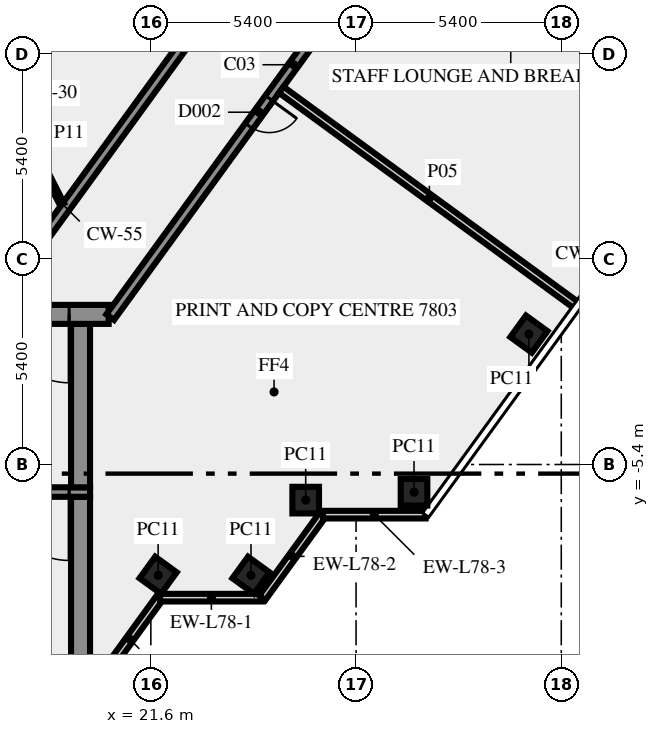
"""IFC4 building model, lengths in metres.
Left out: names, types, materials, properties, quantities, classifications, styles, units other than length and angle.
Written with IfcOpenShell. Run it as: python <this file> out.ifc"""

import sys

from ifc_helpers import new_model, si_unit, direction, frame, frame_2d, origin, origin_2d, place, context, subcontext, project, spatial, rectangle, extrude, element, fill, save


model = new_model("IFC4")
c1 = context("Model", 3, precision=1e-05, world=origin(), true_north=direction((0.0, 1.0)))
c2 = subcontext(c1, "Body", "Model", "MODEL_VIEW")
j1 = project(units=[si_unit("LENGTHUNIT", "METRE"), si_unit("PLANEANGLEUNIT", "RADIAN")], contexts=[c1])
p1 = place(None, origin())
s1 = spatial("IfcSite", under=j1, at=p1, CompositionType="ELEMENT")
p2 = place(p1, origin())
s2 = spatial("IfcBuilding", under=s1, at=p2, CompositionType="ELEMENT")
p3 = place(p2, frame((0.0, 0.0, 335.0)))
s3 = spatial("IfcBuildingStorey", under=s2, at=p3, CompositionType="ELEMENT", Elevation=335.0)
for number, where, z_axis, x_axis in (
    (1, (21.792, -8.315, 0.0), (0.0, 0.0, 1.0), (0.588, 0.809, 0.0)),
    (2, (24.235, -8.315, 0.0), (0.0, 0.0, 1.0), (0.588, 0.809, 0.0)),
    (3, (25.674, -6.337, 0.0), (0.0, 0.0, 1.0), (1.0, 0.0, 0.0)),
    (4, (28.525, -6.13, 0.0), (0.0, 0.0, 1.0), (1.0, 0.0, 0.0)),
    (5, (31.548, -1.969, 0.0), (0.0, 0.0, 1.0), (0.588, 0.809, 0.0)),
):
    element("IfcColumn", number, at=place(p3, frame(where, z_axis=z_axis, x_axis=x_axis)), inside=s3, PredefinedType="COLUMN", context=c2, shape_type="SweptSolid", body=[
        extrude(rectangle(XDim=0.7, YDim=0.7, at=origin_2d()), origin(), (0.0, 0.0, 1.0), 3.65),
    ])
p4 = place(p3, frame((20.253, -11.083, 0.0), z_axis=(0.0, 0.0, 1.0), x_axis=(0.587766567315, 0.809030569476, 0.0)))
e6 = element("IfcWall", 6, at=p4, inside=s3, PredefinedType="SOLIDWALL", context=c2, shape_type="SweptSolid", body=[
    extrude(rectangle(XDim=2.688, YDim=0.2, at=frame_2d((1.344, 0.0))), origin(), (0.0, 0.0, 1.0), 3.65),
])
p5 = place(p3, frame((21.843, -8.904, 0.0), z_axis=(0.0, 0.0, 1.0), x_axis=(1.0, 0.0, 0.0)))
e7 = element("IfcWall", 7, at=p5, inside=s3, PredefinedType="SOLIDWALL", context=c2, shape_type="SweptSolid", body=[
    extrude(rectangle(XDim=2.7, YDim=0.2, at=frame_2d((1.35, 0.0))), origin(), (0.0, 0.0, 1.0), 3.65),
])
p6 = place(p3, frame((24.533, -8.909, 0.0), z_axis=(0.0, 0.0, 1.0), x_axis=(0.587720002413, 0.809064397168, 0.0)))
e8 = element("IfcWall", 8, at=p6, inside=s3, PredefinedType="SOLIDWALL", context=c2, shape_type="SweptSolid", body=[
    extrude(rectangle(XDim=2.7, YDim=0.2, at=frame_2d((1.35, 0.0))), origin(), (0.0, 0.0, 1.0), 3.65),
])
p7 = place(p3, frame((26.13, -6.719, 0.0), z_axis=(0.0, 0.0, 1.0), x_axis=(1.0, 0.0, 0.0)))
e9 = element("IfcWall", 9, at=p7, inside=s3, PredefinedType="SOLIDWALL", context=c2, shape_type="SweptSolid", body=[
    extrude(rectangle(XDim=2.7, YDim=0.2, at=frame_2d((1.35, 0.0))), origin(), (0.0, 0.0, 1.0), 3.65),
])
p8 = place(p3, frame((19.75, -10.5, 0.0), z_axis=(0.0, 0.0, 1.0), x_axis=(0.0, 1.0, 0.0)))
e10 = element("IfcWall", 10, at=p8, inside=s3, PredefinedType="SHEAR", context=c2, shape_type="SweptSolid", body=[
    extrude(rectangle(XDim=4.25, YDim=0.5, at=frame_2d((2.125, 0.0))), origin(), (0.0, 0.0, 1.0), 3.65),
])
p9 = place(p3, frame((20.0, -6.125, 0.0), z_axis=(0.0, 0.0, 1.0), x_axis=(-1.0, 0.0, 0.0)))
e11 = element("IfcWall", 11, at=p9, inside=s3, PredefinedType="SHEAR", context=c2, shape_type="SweptSolid", body=[
    extrude(rectangle(XDim=10.8, YDim=0.25, at=frame_2d((5.4, 0.0))), origin(), (0.0, 0.0, 1.0), 3.65),
])
p10 = place(p9, frame((0.55, 0.0, 0.0)))
e12 = element("IfcOpeningElement", 12, at=p10, cuts=e11, PredefinedType="OPENING", context=c2, shape_type="SweptSolid", body=[
    extrude(rectangle(XDim=1.8, YDim=2.1, at=frame_2d((0.9, 1.05))), frame((0.0, 0.135, 0.0), z_axis=(0.0, -1.0, 0.0), x_axis=(1.0, 0.0, 0.0)), (0.0, 0.0, 1.0), 0.27),
])
p11 = place(p3, frame((19.75, -6.0, 0.0), z_axis=(0.0, 0.0, 1.0), x_axis=(0.0, 1.0, 0.0)))
e13 = element("IfcWall", 13, at=p11, inside=s3, PredefinedType="SHEAR", context=c2, shape_type="SweptSolid", body=[
    extrude(rectangle(XDim=4.3, YDim=0.5, at=frame_2d((2.15, 0.0))), origin(), (0.0, 0.0, 1.0), 3.65),
])
p12 = place(p3, frame((20.49, -1.45, 0.0), z_axis=(0.0, 0.0, 1.0), x_axis=(-1.0, 0.0, 0.0)))
e14 = element("IfcWall", 14, at=p12, inside=s3, PredefinedType="SHEAR", context=c2, shape_type="SweptSolid", body=[
    extrude(rectangle(XDim=40.98, YDim=0.5, at=frame_2d((20.49, 0.0))), origin(), (0.0, 0.0, 1.0), 3.65),
])
p13 = place(p12, frame((38.14, 0.0, 0.0)))
e15 = element("IfcOpeningElement", 15, at=p13, cuts=e14, PredefinedType="OPENING", context=c2, shape_type="SweptSolid", body=[
    extrude(rectangle(XDim=1.8, YDim=2.1, at=frame_2d((0.9, 1.05))), frame((0.0, 0.26, 0.0), z_axis=(0.0, -1.0, 0.0), x_axis=(1.0, 0.0, 0.0)), (0.0, 0.0, 1.0), 0.52),
])
p14 = place(p12, frame((36.728, 0.0, 0.0)))
e16 = element("IfcOpeningElement", 16, at=p14, cuts=e14, PredefinedType="OPENING", context=c2, shape_type="SweptSolid", body=[
    extrude(rectangle(XDim=0.8, YDim=2.1, at=frame_2d((0.4, 1.05))), frame((0.0, 0.26, 0.0), z_axis=(0.0, -1.0, 0.0), x_axis=(1.0, 0.0, 0.0)), (0.0, 0.0, 1.0), 0.52),
])
p15 = place(p12, frame((35.153, 0.0, 0.0)))
e17 = element("IfcOpeningElement", 17, at=p15, cuts=e14, PredefinedType="OPENING", context=c2, shape_type="SweptSolid", body=[
    extrude(rectangle(XDim=0.8, YDim=2.1, at=frame_2d((0.4, 1.05))), frame((0.0, 0.26, 0.0), z_axis=(0.0, -1.0, 0.0), x_axis=(1.0, 0.0, 0.0)), (0.0, 0.0, 1.0), 0.52),
])
p16 = place(p12, frame((32.94, 0.0, 0.0)))
e18 = element("IfcOpeningElement", 18, at=p16, cuts=e14, PredefinedType="OPENING", context=c2, shape_type="SweptSolid", body=[
    extrude(rectangle(XDim=0.9, YDim=2.1, at=frame_2d((0.45, 1.05))), frame((0.0, 0.26, 0.0), z_axis=(0.0, -1.0, 0.0), x_axis=(1.0, 0.0, 0.0)), (0.0, 0.0, 1.0), 0.52),
])
p17 = place(p12, frame((31.015, 0.0, 0.0)))
e19 = element("IfcOpeningElement", 19, at=p17, cuts=e14, PredefinedType="OPENING", context=c2, shape_type="SweptSolid", body=[
    extrude(rectangle(XDim=0.8, YDim=2.1, at=frame_2d((0.4, 1.05))), frame((0.0, 0.26, 0.0), z_axis=(0.0, -1.0, 0.0), x_axis=(1.0, 0.0, 0.0)), (0.0, 0.0, 1.0), 0.52),
])
p18 = place(p12, frame((24.765, 0.0, 0.0)))
e20 = element("IfcOpeningElement", 20, at=p18, cuts=e14, PredefinedType="OPENING", context=c2, shape_type="SweptSolid", body=[
    extrude(rectangle(XDim=0.8, YDim=2.1, at=frame_2d((0.4, 1.05))), frame((0.0, 0.26, 0.0), z_axis=(0.0, -1.0, 0.0), x_axis=(1.0, 0.0, 0.0)), (0.0, 0.0, 1.0), 0.52),
])
p19 = place(p12, frame((19.59, 0.0, 0.0)))
e21 = element("IfcOpeningElement", 21, at=p19, cuts=e14, PredefinedType="OPENING", context=c2, shape_type="SweptSolid", body=[
    extrude(rectangle(XDim=2.0, YDim=2.1, at=frame_2d((1.0, 1.05))), frame((0.0, 0.26, 0.0), z_axis=(0.0, -1.0, 0.0), x_axis=(1.0, 0.0, 0.0)), (0.0, 0.0, 1.0), 0.52),
])
p20 = place(p12, frame((15.103, 0.0, 0.0)))
e22 = element("IfcOpeningElement", 22, at=p20, cuts=e14, PredefinedType="OPENING", context=c2, shape_type="SweptSolid", body=[
    extrude(rectangle(XDim=0.9, YDim=2.1, at=frame_2d((0.45, 1.05))), frame((0.0, 0.26, 0.0), z_axis=(0.0, -1.0, 0.0), x_axis=(1.0, 0.0, 0.0)), (0.0, 0.0, 1.0), 0.52),
])
p21 = place(p12, frame((13.04, 0.0, 0.0)))
e23 = element("IfcOpeningElement", 23, at=p21, cuts=e14, PredefinedType="OPENING", context=c2, shape_type="SweptSolid", body=[
    extrude(rectangle(XDim=0.9, YDim=2.1, at=frame_2d((0.45, 1.05))), frame((0.0, 0.26, 0.0), z_axis=(0.0, -1.0, 0.0), x_axis=(1.0, 0.0, 0.0)), (0.0, 0.0, 1.0), 0.52),
])
p22 = place(p12, frame((10.177, 0.0, 0.0)))
e24 = element("IfcOpeningElement", 24, at=p22, cuts=e14, PredefinedType="OPENING", context=c2, shape_type="SweptSolid", body=[
    extrude(rectangle(XDim=0.9, YDim=2.1, at=frame_2d((0.45, 1.05))), frame((0.0, 0.26, 0.0), z_axis=(0.0, -1.0, 0.0), x_axis=(1.0, 0.0, 0.0)), (0.0, 0.0, 1.0), 0.52),
])
p23 = place(p12, frame((7.14, 0.0, 0.0)))
e25 = element("IfcOpeningElement", 25, at=p23, cuts=e14, PredefinedType="OPENING", context=c2, shape_type="SweptSolid", body=[
    extrude(rectangle(XDim=0.9, YDim=2.1, at=frame_2d((0.45, 1.05))), frame((0.0, 0.26, 0.0), z_axis=(0.0, -1.0, 0.0), x_axis=(1.0, 0.0, 0.0)), (0.0, 0.0, 1.0), 0.52),
])
p24 = place(p12, frame((4.19, 0.0, 0.0)))
e26 = element("IfcOpeningElement", 26, at=p24, cuts=e14, PredefinedType="OPENING", context=c2, shape_type="SweptSolid", body=[
    extrude(rectangle(XDim=0.9, YDim=2.1, at=frame_2d((0.45, 1.05))), frame((0.0, 0.26, 0.0), z_axis=(0.0, -1.0, 0.0), x_axis=(1.0, 0.0, 0.0)), (0.0, 0.0, 1.0), 0.52),
])
p25 = place(p12, frame((1.04, 0.0, 0.0)))
e27 = element("IfcOpeningElement", 27, at=p25, cuts=e14, PredefinedType="OPENING", context=c2, shape_type="SweptSolid", body=[
    extrude(rectangle(XDim=1.8, YDim=2.1, at=frame_2d((0.9, 1.05))), frame((0.0, 0.26, 0.0), z_axis=(0.0, -1.0, 0.0), x_axis=(1.0, 0.0, 0.0)), (0.0, 0.0, 1.0), 0.52),
])
p26 = place(p3, frame((17.545, -1.125, 0.0), z_axis=(0.0, 0.0, 1.0), x_axis=(0.58779555165, 0.809009511354, 0.0)))
e28 = element("IfcWall", 28, at=p26, inside=s3, PredefinedType="SOLIDWALL", context=c2, shape_type="SweptSolid", body=[
    extrude(rectangle(XDim=18.103, YDim=0.25, at=frame_2d((9.052, 0.0))), origin(), (0.0, 0.0, 1.0), 3.65),
])
p27 = place(p26, frame((16.728, 0.0, 0.0)))
e29 = element("IfcOpeningElement", 29, at=p27, cuts=e28, PredefinedType="OPENING", context=c2, shape_type="SweptSolid", body=[
    extrude(rectangle(XDim=0.9, YDim=2.1, at=frame_2d((0.45, 1.05))), frame((0.0, 0.135, 0.0), z_axis=(0.0, -1.0, 0.0), x_axis=(1.0, 0.0, 0.0)), (0.0, 0.0, 1.0), 0.27),
])
p28 = place(p3, frame((30.183, 11.761, 0.0), z_axis=(0.0, 0.0, 1.0), x_axis=(-0.587781762867, -0.80901952958, 0.0)))
e30 = element("IfcWall", 30, at=p28, inside=s3, PredefinedType="SOLIDWALL", context=c2, shape_type="SweptSolid", body=[
    extrude(rectangle(XDim=16.42, YDim=0.25, at=frame_2d((8.21, 0.0))), origin(), (0.0, 0.0, 1.0), 3.65),
])
p29 = place(p28, frame((0.225, 0.0, 0.0)))
e31 = element("IfcOpeningElement", 31, at=p29, cuts=e30, PredefinedType="OPENING", context=c2, shape_type="SweptSolid", body=[
    extrude(rectangle(XDim=0.9, YDim=2.1, at=frame_2d((0.45, 1.05))), frame((0.0, 0.135, 0.0), z_axis=(0.0, -1.0, 0.0), x_axis=(1.0, 0.0, 0.0)), (0.0, 0.0, 1.0), 0.27),
])
p30 = place(p28, frame((9.304, 0.0, 0.0)))
e32 = element("IfcOpeningElement", 32, at=p30, cuts=e30, PredefinedType="OPENING", context=c2, shape_type="SweptSolid", body=[
    extrude(rectangle(XDim=0.9, YDim=2.1, at=frame_2d((0.45, 1.05))), frame((0.0, 0.135, 0.0), z_axis=(0.0, -1.0, 0.0), x_axis=(1.0, 0.0, 0.0)), (0.0, 0.0, 1.0), 0.27),
])
p31 = place(p3, frame((25.032, 4.459, 0.0), z_axis=(0.0, 0.0, 1.0), x_axis=(0.807602415854, -0.589727342004, 0.0)))
e33 = element("IfcWall", 33, at=p31, inside=s3, PredefinedType="SOLIDWALL", context=c2, shape_type="SweptSolid", body=[
    extrude(rectangle(XDim=9.651, YDim=0.2, at=frame_2d((4.826, 0.0))), origin(), (0.0, 0.0, 1.0), 2.95),
])
p32 = place(p3, frame((18.0, 3.925, 0.0), z_axis=(0.0, 0.0, 1.0), x_axis=(0.453950796792, -0.891026752736, 0.0)))
e34 = element("IfcWall", 34, at=p32, inside=s3, PredefinedType="PARTITIONING", context=c2, shape_type="SweptSolid", body=[
    extrude(rectangle(XDim=2.778, YDim=0.12, at=frame_2d((1.389, 0.0))), origin(), (0.0, 0.0, 1.0), 3.65),
])
p33 = place(p10, origin())
e35 = element("IfcDoor", 35, at=p33, inside=s3, OperationType="DOUBLE_DOOR_SINGLE_SWING", PredefinedType="DOOR", context=c2, shape_type="SweptSolid", body=[
    extrude(rectangle(XDim=1.8, YDim=2.1, at=frame_2d((0.9, 1.05))), frame((0.0, 0.025, 0.0), z_axis=(0.0, -1.0, 0.0), x_axis=(1.0, 0.0, 0.0)), (0.0, 0.0, 1.0), 0.05),
])
fill(e12, e35)
p34 = place(p25, origin())
e36 = element("IfcDoor", 36, at=p34, inside=s3, OperationType="DOUBLE_DOOR_SINGLE_SWING", PredefinedType="DOOR", context=c2, shape_type="SweptSolid", body=[
    extrude(rectangle(XDim=1.8, YDim=2.1, at=frame_2d((0.9, 1.05))), frame((0.0, 0.025, 0.0), z_axis=(0.0, -1.0, 0.0), x_axis=(1.0, 0.0, 0.0)), (0.0, 0.0, 1.0), 0.05),
])
fill(e27, e36)
p35 = place(p30, origin())
e37 = element("IfcDoor", 37, at=p35, inside=s3, OperationType="SINGLE_SWING_LEFT", PredefinedType="DOOR", context=c2, shape_type="SweptSolid", body=[
    extrude(rectangle(XDim=0.9, YDim=2.1, at=frame_2d((0.45, 1.05))), frame((0.0, 0.025, 0.0), z_axis=(0.0, -1.0, 0.0), x_axis=(1.0, 0.0, 0.0)), (0.0, 0.0, 1.0), 0.05),
])
fill(e32, e37)
save(model, sys.argv[1])
